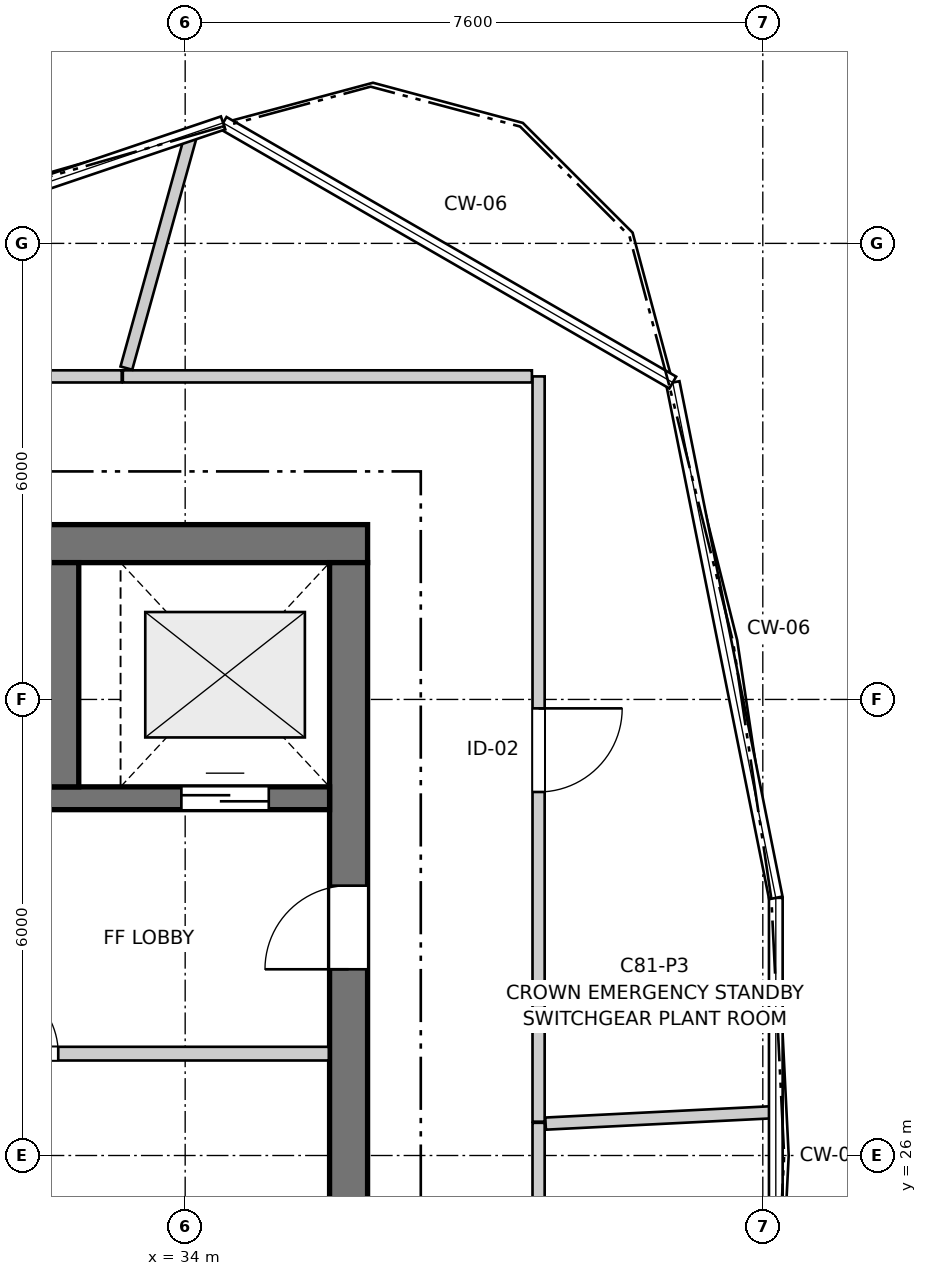
"""IFC4 building model, lengths in metres.
Left out: names, types, materials, properties, quantities, classifications, styles, units other than length and angle.
Written with IfcOpenShell. Run it as: python <this file> out.ifc"""

import sys

from ifc_helpers import new_model, si_unit, direction, frame, frame_2d, origin, place, context, subcontext, project, spatial, rectangle, extrude, source, transform, mapped, element, fill, save


model = new_model("IFC4")
c1 = context("Model", 3, precision=1e-05, world=origin(), true_north=direction((0.0, 1.0)))
c2 = subcontext(c1, "Body", "Model", "MODEL_VIEW")
j1 = project(units=[si_unit("LENGTHUNIT", "METRE"), si_unit("PLANEANGLEUNIT", "RADIAN")], contexts=[c1])
p1 = place(None, origin())
s1 = spatial("IfcSite", under=j1, at=p1, CompositionType="ELEMENT")
p2 = place(p1, origin())
s2 = spatial("IfcBuilding", under=s1, at=p2, CompositionType="ELEMENT")
p3 = place(p2, frame((0.0, 0.0, 274.7)))
s3 = spatial("IfcBuildingStorey", under=s2, at=p3, CompositionType="ELEMENT", Elevation=274.7)
p4 = place(p3, frame((36.4, 34.05, 0.0), z_axis=(0.0, 0.0, 1.0), x_axis=(-1.0, 0.0, 0.0)))
e1 = element("IfcWall", 1, at=p4, inside=s3, PredefinedType="SHEAR", context=c2, shape_type="SweptSolid", body=[
    extrude(rectangle(XDim=12.1, YDim=0.5, at=frame_2d((6.05, 0.0))), origin(), (0.0, 0.0, 1.0), 3.062),
])
p5 = place(p3, frame((36.15, 18.2, 0.0), z_axis=(0.0, 0.0, 1.0), x_axis=(0.0, 1.0, 0.0)))
e2 = element("IfcWall", 2, at=p5, inside=s3, PredefinedType="SHEAR", context=c2, shape_type="SweptSolid", body=[
    extrude(rectangle(XDim=15.6, YDim=0.5, at=frame_2d((7.8, 0.0))), origin(), (0.0, 0.0, 1.0), 3.062),
])
p6 = place(p5, frame((4.25, 0.0, 0.0)))
e3 = element("IfcOpeningElement", 3, at=p6, cuts=e2, PredefinedType="OPENING", context=c2, shape_type="SweptSolid", body=[
    extrude(rectangle(XDim=1.1, YDim=2.15, at=frame_2d((0.55, 1.075))), frame((0.0, 0.26, 0.0), z_axis=(0.0, -1.0, 0.0), x_axis=(1.0, 0.0, 0.0)), (0.0, 0.0, 1.0), 0.52),
])
p7 = place(p5, frame((10.25, 0.0, 0.0)))
e4 = element("IfcOpeningElement", 4, at=p7, cuts=e2, PredefinedType="OPENING", context=c2, shape_type="SweptSolid", body=[
    extrude(rectangle(XDim=1.1, YDim=2.15, at=frame_2d((0.55, 1.075))), frame((0.0, 0.26, 0.0), z_axis=(0.0, -1.0, 0.0), x_axis=(1.0, 0.0, 0.0)), (0.0, 0.0, 1.0), 0.52),
])
p8 = place(p3, frame((24.8, 30.7, 0.0), z_axis=(0.0, 0.0, 1.0), x_axis=(1.0, 0.0, 0.0)))
e5 = element("IfcWall", 5, at=p8, inside=s3, PredefinedType="SHEAR", context=c2, shape_type="SweptSolid", body=[
    extrude(rectangle(XDim=11.1, YDim=0.3, at=frame_2d((5.55, 0.0))), origin(), (0.0, 0.0, 1.0), 3.062),
])
p9 = place(p8, frame((6.22, 0.0, 0.0)))
e6 = element("IfcOpeningElement", 6, at=p9, cuts=e5, PredefinedType="OPENING", context=c2, shape_type="SweptSolid", body=[
    extrude(rectangle(XDim=0.98, YDim=2.15, at=frame_2d((0.49, 1.075))), frame((0.0, 0.16, 0.0), z_axis=(0.0, -1.0, 0.0), x_axis=(1.0, 0.0, 0.0)), (0.0, 0.0, 1.0), 0.32),
])
p10 = place(p8, frame((9.15, 0.0, 0.0)))
e7 = element("IfcOpeningElement", 7, at=p10, cuts=e5, PredefinedType="OPENING", context=c2, shape_type="SweptSolid", body=[
    extrude(rectangle(XDim=1.15, YDim=2.15, at=frame_2d((0.575, 1.075))), frame((0.0, 0.16, 0.0), z_axis=(0.0, -1.0, 0.0), x_axis=(1.0, 0.0, 0.0)), (0.0, 0.0, 1.0), 0.32),
])
p11 = place(p3, frame((32.4, 30.85, 0.0), z_axis=(0.0, 0.0, 1.0), x_axis=(0.0, 1.0, 0.0)))
e8 = element("IfcWall", 8, at=p11, inside=s3, PredefinedType="SHEAR", context=c2, shape_type="SweptSolid", body=[
    extrude(rectangle(XDim=2.95, YDim=0.4, at=frame_2d((1.475, 0.0))), origin(), (0.0, 0.0, 1.0), 3.062),
])
p12 = place(p3, frame((30.67, 27.34, 0.0), z_axis=(0.0, 0.0, 1.0), x_axis=(1.0, 0.0, 0.0)))
e9 = element("IfcWall", 9, at=p12, inside=s3, PredefinedType="PARTITIONING", context=c2, shape_type="SweptSolid", body=[
    extrude(rectangle(XDim=5.22, YDim=0.18, at=frame_2d((2.61, 0.0))), origin(), (0.0, 0.0, 1.0), 2.23),
])
p13 = place(p12, frame((0.68, 0.0, 0.0)))
e10 = element("IfcOpeningElement", 10, at=p13, cuts=e9, PredefinedType="OPENING", context=c2, shape_type="SweptSolid", body=[
    extrude(rectangle(XDim=0.98, YDim=2.15, at=frame_2d((0.49, 1.075))), frame((0.0, 0.1, 0.0), z_axis=(0.0, -1.0, 0.0), x_axis=(1.0, 0.0, 0.0)), (0.0, 0.0, 1.0), 0.2),
])
p14 = place(p3, frame((38.65, 26.43, 0.0), z_axis=(0.0, 0.0, 1.0), x_axis=(0.0, -1.0, 0.0)))
e11 = element("IfcWall", 11, at=p14, inside=s3, PredefinedType="PARTITIONING", context=c2, shape_type="SweptSolid", body=[
    extrude(rectangle(XDim=10.68, YDim=0.16, at=frame_2d((5.34, 0.0))), origin(), (0.0, 0.0, 1.0), 2.23),
])
p15 = place(p14, frame((4.798, 0.0, 0.0)))
e12 = element("IfcOpeningElement", 12, at=p15, cuts=e11, PredefinedType="OPENING", context=c2, shape_type="SweptSolid", body=[
    extrude(rectangle(XDim=1.1, YDim=2.15, at=frame_2d((0.55, 1.075))), frame((0.0, 0.09, 0.0), z_axis=(0.0, -1.0, 0.0), x_axis=(1.0, 0.0, 0.0)), (0.0, 0.0, 1.0), 0.18),
])
p16 = place(p3, frame((38.65, 36.25, 0.0), z_axis=(0.0, 0.0, 1.0), x_axis=(0.0, -1.0, 0.0)))
e13 = element("IfcWall", 13, at=p16, inside=s3, PredefinedType="PARTITIONING", context=c2, shape_type="SweptSolid", body=[
    extrude(rectangle(XDim=9.805, YDim=0.16, at=frame_2d((4.902, 0.0))), origin(), (0.0, 0.0, 1.0), 2.23),
])
p17 = place(p16, frame((4.367, 0.0, 0.0)))
e14 = element("IfcOpeningElement", 14, at=p17, cuts=e13, PredefinedType="OPENING", context=c2, shape_type="SweptSolid", body=[
    extrude(rectangle(XDim=1.1, YDim=2.15, at=frame_2d((0.55, 1.075))), frame((0.0, 0.09, 0.0), z_axis=(0.0, -1.0, 0.0), x_axis=(1.0, 0.0, 0.0)), (0.0, 0.0, 1.0), 0.18),
])
p18 = place(p3, frame((33.165, 36.25, 0.0), z_axis=(0.0, 0.0, 1.0), x_axis=(-1.0, 0.0, 0.0)))
e15 = element("IfcWall", 15, at=p18, inside=s3, PredefinedType="PARTITIONING", context=c2, shape_type="SweptSolid", body=[
    extrude(rectangle(XDim=4.665, YDim=0.16, at=frame_2d((2.333, 0.0))), origin(), (0.0, 0.0, 1.0), 2.23),
])
p19 = place(p18, frame((1.767, 0.0, 0.0)))
e16 = element("IfcOpeningElement", 16, at=p19, cuts=e15, PredefinedType="OPENING", context=c2, shape_type="SweptSolid", body=[
    extrude(rectangle(XDim=1.1, YDim=2.15, at=frame_2d((0.55, 1.075))), frame((0.0, 0.09, 0.0), z_axis=(0.0, -1.0, 0.0), x_axis=(1.0, 0.0, 0.0)), (0.0, 0.0, 1.0), 0.18),
])
p20 = place(p3, frame((33.18, 36.25, 0.0), z_axis=(0.0, 0.0, 1.0), x_axis=(1.0, 0.0, 0.0)))
e17 = element("IfcWall", 17, at=p20, inside=s3, PredefinedType="PARTITIONING", context=c2, shape_type="SweptSolid", body=[
    extrude(rectangle(XDim=5.382, YDim=0.16, at=frame_2d((2.691, 0.0))), origin(), (0.0, 0.0, 1.0), 2.23),
])
p21 = place(p3, frame((33.226, 36.359, 0.0), z_axis=(0.0, 0.0, 1.0), x_axis=(0.267310296681, 0.96361050497, 0.0)))
e18 = element("IfcWall", 18, at=p21, inside=s3, PredefinedType="PARTITIONING", context=c2, shape_type="SweptSolid", body=[
    extrude(rectangle(XDim=3.171, YDim=0.16, at=frame_2d((1.585, 0.0))), origin(), (0.0, 0.0, 1.0), 2.23),
])
p22 = place(p3, frame((38.742, 26.42, 0.0), z_axis=(0.0, 0.0, 1.0), x_axis=(0.998747676097, 0.050030785433, 0.0)))
e19 = element("IfcWall", 19, at=p22, inside=s3, PredefinedType="PARTITIONING", context=c2, shape_type="SweptSolid", body=[
    extrude(rectangle(XDim=3.006, YDim=0.16, at=frame_2d((1.503, 0.0))), origin(), (0.0, 0.0, 1.0), 2.23),
])
m1 = source(origin(), c2, "Body", "SweptSolid", [
    extrude(rectangle(XDim=1.15, YDim=2.15, at=frame_2d((0.575, 1.075))), frame((0.0, 0.025, 0.0), z_axis=(0.0, -1.0, 0.0), x_axis=(1.0, 0.0, 0.0)), (0.0, 0.0, 1.0), 0.05),
])
p23 = place(p10, origin())
e20 = element("IfcDoor", 20, at=p23, inside=s3, OperationType="DOUBLE_DOOR_SLIDING", PredefinedType="DOOR", context=c2, shape_type="MappedRepresentation", body=[
    mapped(m1, transform((0.0, 0.0, 0.0), x_axis=(1.0, 0.0, 0.0), y_axis=(0.0, 1.0, 0.0), z_axis=(0.0, 0.0, 1.0), scale=1.0)),
])
fill(e7, e20)
m2 = source(origin(), c2, "Body", "SweptSolid", [
    extrude(rectangle(XDim=1.1, YDim=2.15, at=frame_2d((0.55, 1.075))), frame((0.0, 0.025, 0.0), z_axis=(0.0, -1.0, 0.0), x_axis=(1.0, 0.0, 0.0)), (0.0, 0.0, 1.0), 0.05),
])
p24 = place(p7, origin())
e21 = element("IfcDoor", 21, at=p24, inside=s3, OperationType="SINGLE_SWING_LEFT", PredefinedType="DOOR", context=c2, shape_type="MappedRepresentation", body=[
    mapped(m2, transform((0.0, 0.0, 0.0), x_axis=(1.0, 0.0, 0.0), y_axis=(0.0, 1.0, 0.0), z_axis=(0.0, 0.0, 1.0), scale=1.0)),
])
fill(e4, e21)
m3 = source(origin(), c2, "Body", "SweptSolid", [
    extrude(rectangle(XDim=0.98, YDim=2.15, at=frame_2d((0.49, 1.075))), frame((0.0, 0.025, 0.0), z_axis=(0.0, -1.0, 0.0), x_axis=(1.0, 0.0, 0.0)), (0.0, 0.0, 1.0), 0.05),
])
p25 = place(p13, origin())
e22 = element("IfcDoor", 22, at=p25, inside=s3, OperationType="SINGLE_SWING_LEFT", PredefinedType="DOOR", context=c2, shape_type="MappedRepresentation", body=[
    mapped(m3, transform((0.0, 0.0, 0.0), x_axis=(1.0, 0.0, 0.0), y_axis=(0.0, 1.0, 0.0), z_axis=(0.0, 0.0, 1.0), scale=1.0)),
])
fill(e10, e22)
p26 = place(p17, origin())
e23 = element("IfcDoor", 23, at=p26, inside=s3, OperationType="SINGLE_SWING_LEFT", PredefinedType="DOOR", context=c2, shape_type="MappedRepresentation", body=[
    mapped(m2, transform((0.0, 0.0, 0.0), x_axis=(1.0, 0.0, 0.0), y_axis=(0.0, 1.0, 0.0), z_axis=(0.0, 0.0, 1.0), scale=1.0)),
])
fill(e14, e23)
save(model, sys.argv[1])
